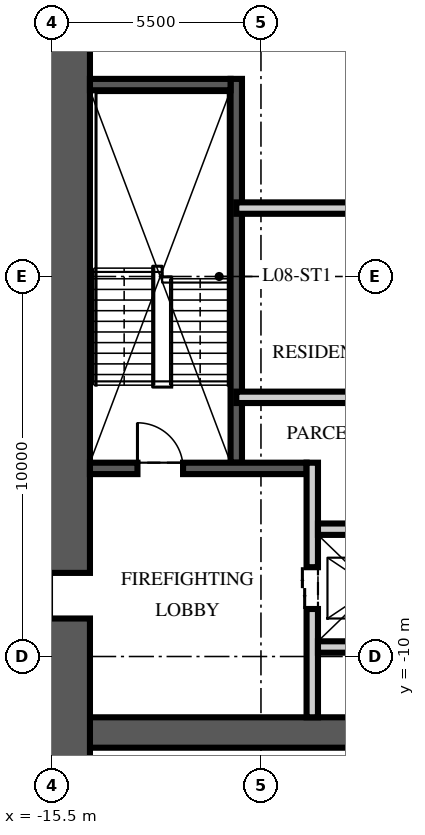
"""IFC4 building model, lengths in metres.
Left out: names, types, materials, properties, quantities, classifications, styles, units other than length and angle.
Written with IfcOpenShell. Run it as: python <this file> out.ifc"""

import sys

from ifc_helpers import new_model, si_unit, direction, frame, frame_2d, origin, place, context, subcontext, project, spatial, rectangle, extrude, element, fill, save


model = new_model("IFC4")
c1 = context("Model", 3, precision=1e-05, world=origin(), true_north=direction((0.0, 1.0)))
c2 = subcontext(c1, "Body", "Model", "MODEL_VIEW")
j1 = project(units=[si_unit("LENGTHUNIT", "METRE"), si_unit("PLANEANGLEUNIT", "RADIAN")], contexts=[c1])
p1 = place(None, origin())
s1 = spatial("IfcSite", under=j1, at=p1, CompositionType="ELEMENT")
p2 = place(p1, origin())
s2 = spatial("IfcBuilding", under=s1, at=p2, CompositionType="ELEMENT")
p3 = place(p2, frame((0.0, 0.0, 36.0)))
s3 = spatial("IfcBuildingStorey", under=s2, at=p3, CompositionType="ELEMENT", Elevation=36.0)
p4 = place(p3, frame((-15.5, -12.0, -0.25), z_axis=(0.0, 0.0, 1.0), x_axis=(1.0, 0.0, 0.0)))
e1 = element("IfcWall", 1, at=p4, inside=s3, PredefinedType="SHEAR", context=c2, shape_type="SweptSolid", body=[
    extrude(rectangle(XDim=31.0, YDim=0.8, at=frame_2d((15.5, 0.0))), origin(), (0.0, 0.0, 1.0), 3.75),
])
p5 = place(p3, frame((-15.5, -15.5, -0.25), z_axis=(0.0, 0.0, 1.0), x_axis=(0.0, 1.0, 0.0)))
e2 = element("IfcWall", 2, at=p5, inside=s3, PredefinedType="SHEAR", context=c2, shape_type="SweptSolid", body=[
    extrude(rectangle(XDim=31.0, YDim=2.0, at=frame_2d((15.5, 0.0))), origin(), (0.0, 0.0, 1.0), 3.75),
])
p6 = place(p5, frame((6.5, 0.0, 0.25)))
e3 = element("IfcOpeningElement", 3, at=p6, cuts=e2, PredefinedType="OPENING", context=c2, shape_type="SweptSolid", body=[
    extrude(rectangle(XDim=1.2, YDim=2.1, at=frame_2d((0.6, 1.05))), frame((0.0, 1.01, 0.0), z_axis=(0.0, -1.0, 0.0), x_axis=(1.0, 0.0, 0.0)), (0.0, 0.0, 1.0), 2.02),
])
p7 = place(p5, frame((23.0, 0.0, 0.25)))
e4 = element("IfcOpeningElement", 4, at=p7, cuts=e2, PredefinedType="OPENING", context=c2, shape_type="SweptSolid", body=[
    extrude(rectangle(XDim=1.8, YDim=2.1, at=frame_2d((0.9, 1.05))), frame((0.0, 1.01, 0.0), z_axis=(0.0, -1.0, 0.0), x_axis=(1.0, 0.0, 0.0)), (0.0, 0.0, 1.0), 2.02),
])
p8 = place(p3, frame((-10.65, -4.9, 0.0), z_axis=(0.0, 0.0, 1.0), x_axis=(0.0, 1.0, 0.0)))
e5 = element("IfcWall", 5, at=p8, inside=s3, PredefinedType="SOLIDWALL", context=c2, shape_type="SweptSolid", body=[
    extrude(rectangle(XDim=10.1, YDim=0.3, at=frame_2d((5.05, 0.0))), origin(), (0.0, 0.0, 1.0), 3.5),
])
p9 = place(p3, frame((-14.5, -5.05, 0.0), z_axis=(0.0, 0.0, 1.0), x_axis=(1.0, 0.0, 0.0)))
e6 = element("IfcWall", 6, at=p9, inside=s3, PredefinedType="SOLIDWALL", context=c2, shape_type="SweptSolid", body=[
    extrude(rectangle(XDim=5.7, YDim=0.3, at=frame_2d((2.85, 0.0))), origin(), (0.0, 0.0, 1.0), 3.5),
])
p10 = place(p9, frame((1.25, 0.0, 0.0)))
e7 = element("IfcOpeningElement", 7, at=p10, cuts=e6, PredefinedType="OPENING", context=c2, shape_type="SweptSolid", body=[
    extrude(rectangle(XDim=1.2, YDim=2.1, at=frame_2d((0.6, 1.05))), frame((0.0, 0.16, 0.0), z_axis=(0.0, -1.0, 0.0), x_axis=(1.0, 0.0, 0.0)), (0.0, 0.0, 1.0), 0.32),
])
p11 = place(p3, frame((-14.5, 5.05, 0.0), z_axis=(0.0, 0.0, 1.0), x_axis=(1.0, 0.0, 0.0)))
e8 = element("IfcWall", 8, at=p11, inside=s3, PredefinedType="SOLIDWALL", context=c2, shape_type="SweptSolid", body=[
    extrude(rectangle(XDim=3.7, YDim=0.3, at=frame_2d((1.85, 0.0))), origin(), (0.0, 0.0, 1.0), 3.5),
])
p12 = place(p3, frame((-8.65, -11.6, 0.0), z_axis=(0.0, 0.0, 1.0), x_axis=(0.0, 1.0, 0.0)))
e9 = element("IfcWall", 9, at=p12, inside=s3, PredefinedType="PARTITIONING", context=c2, shape_type="SweptSolid", body=[
    extrude(rectangle(XDim=6.7, YDim=0.3, at=frame_2d((3.35, 0.0))), origin(), (0.0, 0.0, 1.0), 3.5),
])
p13 = place(p12, frame((2.85, 0.0, 0.0)))
e10 = element("IfcOpeningElement", 10, at=p13, cuts=e9, PredefinedType="OPENING", context=c2, shape_type="SweptSolid", body=[
    extrude(rectangle(XDim=1.1, YDim=2.1, at=frame_2d((0.55, 1.05))), frame((0.0, 0.16, 0.0), z_axis=(0.0, -1.0, 0.0), x_axis=(1.0, 0.0, 0.0)), (0.0, 0.0, 1.0), 0.32),
])
p14 = place(p3, frame((-8.5, -6.65, 0.0), z_axis=(0.0, 0.0, 1.0), x_axis=(1.0, 0.0, 0.0)))
e11 = element("IfcWall", 11, at=p14, inside=s3, PredefinedType="PARTITIONING", context=c2, shape_type="SweptSolid", body=[
    extrude(rectangle(XDim=17.0, YDim=0.3, at=frame_2d((8.5, 0.0))), origin(), (0.0, 0.0, 1.0), 3.5),
])
p15 = place(p14, frame((7.8, 0.0, 0.0)))
e12 = element("IfcOpeningElement", 12, at=p15, cuts=e11, PredefinedType="OPENING", context=c2, shape_type="SweptSolid", body=[
    extrude(rectangle(XDim=1.3, YDim=2.4, at=frame_2d((0.65, 1.2))), frame((0.0, 0.16, 0.0), z_axis=(0.0, -1.0, 0.0), x_axis=(1.0, 0.0, 0.0)), (0.0, 0.0, 1.0), 0.32),
])
p16 = place(p14, frame((5.65, 0.0, 0.0)))
e13 = element("IfcOpeningElement", 13, at=p16, cuts=e11, PredefinedType="OPENING", context=c2, shape_type="SweptSolid", body=[
    extrude(rectangle(XDim=0.9, YDim=2.1, at=frame_2d((0.45, 1.05))), frame((0.0, 0.16, 0.0), z_axis=(0.0, -1.0, 0.0), x_axis=(1.0, 0.0, 0.0)), (0.0, 0.0, 1.0), 0.32),
])
p17 = place(p14, frame((10.4, 0.0, 0.0)))
e14 = element("IfcOpeningElement", 14, at=p17, cuts=e11, PredefinedType="OPENING", context=c2, shape_type="SweptSolid", body=[
    extrude(rectangle(XDim=0.9, YDim=2.1, at=frame_2d((0.45, 1.05))), frame((0.0, 0.16, 0.0), z_axis=(0.0, -1.0, 0.0), x_axis=(1.0, 0.0, 0.0)), (0.0, 0.0, 1.0), 0.32),
])
p18 = place(p3, frame((-8.5, -9.75, 0.0), z_axis=(0.0, 0.0, 1.0), x_axis=(1.0, 0.0, 0.0)))
e15 = element("IfcWall", 15, at=p18, inside=s3, PredefinedType="PARTITIONING", context=c2, shape_type="SweptSolid", body=[
    extrude(rectangle(XDim=2.9, YDim=0.3, at=frame_2d((1.45, 0.0))), origin(), (0.0, 0.0, 1.0), 3.5),
])
p19 = place(p3, frame((-10.65, 1.8, 0.0), z_axis=(0.0, 0.0, 1.0), x_axis=(1.0, 0.0, 0.0)))
e16 = element("IfcWall", 16, at=p19, inside=s3, PredefinedType="PARTITIONING", context=c2, shape_type="SweptSolid", body=[
    extrude(rectangle(XDim=21.3, YDim=0.3, at=frame_2d((10.65, 0.0))), origin(), (0.0, 0.0, 1.0), 3.5),
])
p20 = place(p19, frame((10.05, 0.0, 0.0)))
e17 = element("IfcOpeningElement", 17, at=p20, cuts=e16, PredefinedType="OPENING", context=c2, shape_type="SweptSolid", body=[
    extrude(rectangle(XDim=1.2, YDim=2.1, at=frame_2d((0.6, 1.05))), frame((0.0, 0.16, 0.0), z_axis=(0.0, -1.0, 0.0), x_axis=(1.0, 0.0, 0.0)), (0.0, 0.0, 1.0), 0.32),
])
p21 = place(p19, frame((19.238, 0.0, 0.0)))
e18 = element("IfcOpeningElement", 18, at=p21, cuts=e16, PredefinedType="OPENING", context=c2, shape_type="SweptSolid", body=[
    extrude(rectangle(XDim=0.9, YDim=2.1, at=frame_2d((0.45, 1.05))), frame((0.0, 0.16, 0.0), z_axis=(0.0, -1.0, 0.0), x_axis=(1.0, 0.0, 0.0)), (0.0, 0.0, 1.0), 0.32),
])
p22 = place(p3, frame((-10.65, -3.18, 0.0), z_axis=(0.0, 0.0, 1.0), x_axis=(1.0, 0.0, 0.0)))
e19 = element("IfcWall", 19, at=p22, inside=s3, PredefinedType="PARTITIONING", context=c2, shape_type="SweptSolid", body=[
    extrude(rectangle(XDim=6.45, YDim=0.3, at=frame_2d((3.225, 0.0))), origin(), (0.0, 0.0, 1.0), 3.5),
])
p23 = place(p10, origin())
e20 = element("IfcDoor", 20, at=p23, inside=s3, OperationType="SINGLE_SWING_LEFT", PredefinedType="DOOR", context=c2, shape_type="SweptSolid", body=[
    extrude(rectangle(XDim=1.2, YDim=2.1, at=frame_2d((0.6, 1.05))), frame((0.0, 0.025, 0.0), z_axis=(0.0, -1.0, 0.0), x_axis=(1.0, 0.0, 0.0)), (0.0, 0.0, 1.0), 0.05),
])
fill(e7, e20)
p24 = place(p6, origin())
e21 = element("IfcDoor", 21, at=p24, inside=s3, OperationType="SINGLE_SWING_LEFT", PredefinedType="DOOR", context=c2, shape_type="SweptSolid", body=[
    extrude(rectangle(XDim=1.2, YDim=2.1, at=frame_2d((0.6, 1.05))), frame((0.0, 0.025, 0.0), z_axis=(0.0, -1.0, 0.0), x_axis=(1.0, 0.0, 0.0)), (0.0, 0.0, 1.0), 0.05),
])
fill(e3, e21)
p25 = place(p13, origin())
e22 = element("IfcDoor", 22, at=p25, inside=s3, OperationType="DOUBLE_DOOR_SLIDING", PredefinedType="DOOR", context=c2, shape_type="SweptSolid", body=[
    extrude(rectangle(XDim=1.1, YDim=2.1, at=frame_2d((0.55, 1.05))), frame((0.0, 0.025, 0.0), z_axis=(0.0, -1.0, 0.0), x_axis=(1.0, 0.0, 0.0)), (0.0, 0.0, 1.0), 0.05),
])
fill(e10, e22)
save(model, sys.argv[1])
